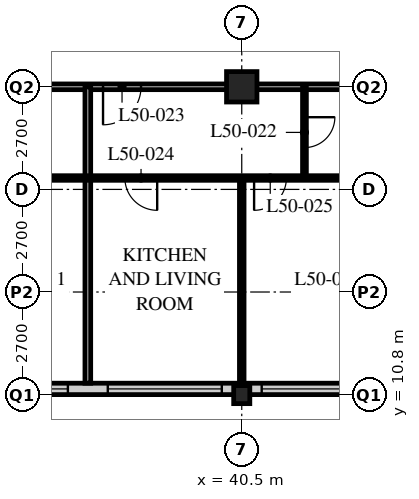
"""IFC4 building model, lengths in metres.
Left out: names, types, materials, properties, quantities, classifications, styles, units other than length and angle.
Written with IfcOpenShell. Run it as: python <this file> out.ifc"""

import sys

from ifc_helpers import new_model, si_unit, direction, frame, frame_2d, origin, origin_2d, place, context, subcontext, project, spatial, rectangle, hollow_rectangle, i_section, extrude, element, fill, save


model = new_model("IFC4")
c1 = context("Model", 3, precision=1e-05, world=origin(), true_north=direction((0.0, 1.0)))
c2 = subcontext(c1, "Body", "Model", "MODEL_VIEW")
j1 = project(units=[si_unit("LENGTHUNIT", "METRE"), si_unit("PLANEANGLEUNIT", "RADIAN")], contexts=[c1])
p1 = place(None, origin())
s1 = spatial("IfcSite", under=j1, at=p1, CompositionType="ELEMENT")
p2 = place(p1, origin())
s2 = spatial("IfcBuilding", under=s1, at=p2, CompositionType="ELEMENT")
p3 = place(p2, frame((0.0, 0.0, 195.6)))
s3 = spatial("IfcBuildingStorey", under=s2, at=p3, CompositionType="ELEMENT", Elevation=195.6)
p4 = place(p3, frame((40.5, 10.8, 0.0), z_axis=(0.0, 0.0, 1.0), x_axis=(1.0, 0.0, 0.0)))
e1 = element("IfcColumn", 1, at=p4, inside=s3, PredefinedType="COLUMN", context=c2, shape_type="SweptSolid", body=[
    extrude(i_section(OverallWidth=0.424, OverallDepth=0.475, WebThickness=0.048, FlangeThickness=0.077, FilletRadius=0.015, at=origin_2d()), origin(), (0.0, 0.0, 1.0), 3.6),
])
p5 = place(p3, frame((40.5, 18.9, 0.0), z_axis=(0.0, 0.0, 1.0), x_axis=(1.0, 0.0, 0.0)))
e2 = element("IfcColumn", 2, at=p5, inside=s3, PredefinedType="COLUMN", context=c2, shape_type="SweptSolid", body=[
    extrude(hollow_rectangle(XDim=0.8, YDim=0.8, WallThickness=0.08, at=origin_2d()), origin(), (0.0, 0.0, 1.0), 3.6),
])
p6 = place(p3, frame((8.4, 10.95, 0.0), z_axis=(0.0, 0.0, 1.0), x_axis=(1.0, 0.0, 0.0)))
e3 = element("IfcWall", 3, at=p6, inside=s3, PredefinedType="SOLIDWALL", context=c2, shape_type="SweptSolid", body=[
    extrude(rectangle(XDim=40.2, YDim=0.3, at=frame_2d((20.1, 0.0))), origin(), (0.0, 0.0, 1.0), 3.39),
])
p7 = place(p6, frame((0.225, 0.0, 0.6)))
e4 = element("IfcOpeningElement", 4, at=p7, cuts=e3, PredefinedType="OPENING", context=c2, shape_type="SweptSolid", body=[
    extrude(rectangle(XDim=3.0, YDim=2.4, at=frame_2d((1.5, 1.2))), frame((0.0, 0.16, 0.0), z_axis=(0.0, -1.0, 0.0), x_axis=(1.0, 0.0, 0.0)), (0.0, 0.0, 1.0), 0.32),
])
p8 = place(p6, frame((4.275, 0.0, 0.6)))
e5 = element("IfcOpeningElement", 5, at=p8, cuts=e3, PredefinedType="OPENING", context=c2, shape_type="SweptSolid", body=[
    extrude(rectangle(XDim=3.0, YDim=2.4, at=frame_2d((1.5, 1.2))), frame((0.0, 0.16, 0.0), z_axis=(0.0, -1.0, 0.0), x_axis=(1.0, 0.0, 0.0)), (0.0, 0.0, 1.0), 0.32),
])
p9 = place(p6, frame((8.325, 0.0, 0.6)))
e6 = element("IfcOpeningElement", 6, at=p9, cuts=e3, PredefinedType="OPENING", context=c2, shape_type="SweptSolid", body=[
    extrude(rectangle(XDim=3.0, YDim=2.4, at=frame_2d((1.5, 1.2))), frame((0.0, 0.16, 0.0), z_axis=(0.0, -1.0, 0.0), x_axis=(1.0, 0.0, 0.0)), (0.0, 0.0, 1.0), 0.32),
])
p10 = place(p6, frame((12.375, 0.0, 0.6)))
e7 = element("IfcOpeningElement", 7, at=p10, cuts=e3, PredefinedType="OPENING", context=c2, shape_type="SweptSolid", body=[
    extrude(rectangle(XDim=3.0, YDim=2.4, at=frame_2d((1.5, 1.2))), frame((0.0, 0.16, 0.0), z_axis=(0.0, -1.0, 0.0), x_axis=(1.0, 0.0, 0.0)), (0.0, 0.0, 1.0), 0.32),
])
p11 = place(p6, frame((16.425, 0.0, 0.6)))
e8 = element("IfcOpeningElement", 8, at=p11, cuts=e3, PredefinedType="OPENING", context=c2, shape_type="SweptSolid", body=[
    extrude(rectangle(XDim=3.0, YDim=2.4, at=frame_2d((1.5, 1.2))), frame((0.0, 0.16, 0.0), z_axis=(0.0, -1.0, 0.0), x_axis=(1.0, 0.0, 0.0)), (0.0, 0.0, 1.0), 0.32),
])
p12 = place(p6, frame((20.475, 0.0, 0.6)))
e9 = element("IfcOpeningElement", 9, at=p12, cuts=e3, PredefinedType="OPENING", context=c2, shape_type="SweptSolid", body=[
    extrude(rectangle(XDim=3.0, YDim=2.4, at=frame_2d((1.5, 1.2))), frame((0.0, 0.16, 0.0), z_axis=(0.0, -1.0, 0.0), x_axis=(1.0, 0.0, 0.0)), (0.0, 0.0, 1.0), 0.32),
])
p13 = place(p6, frame((24.525, 0.0, 0.6)))
e10 = element("IfcOpeningElement", 10, at=p13, cuts=e3, PredefinedType="OPENING", context=c2, shape_type="SweptSolid", body=[
    extrude(rectangle(XDim=3.0, YDim=2.4, at=frame_2d((1.5, 1.2))), frame((0.0, 0.16, 0.0), z_axis=(0.0, -1.0, 0.0), x_axis=(1.0, 0.0, 0.0)), (0.0, 0.0, 1.0), 0.32),
])
p14 = place(p6, frame((28.575, 0.0, 0.6)))
e11 = element("IfcOpeningElement", 11, at=p14, cuts=e3, PredefinedType="OPENING", context=c2, shape_type="SweptSolid", body=[
    extrude(rectangle(XDim=3.0, YDim=2.4, at=frame_2d((1.5, 1.2))), frame((0.0, 0.16, 0.0), z_axis=(0.0, -1.0, 0.0), x_axis=(1.0, 0.0, 0.0)), (0.0, 0.0, 1.0), 0.32),
])
p15 = place(p6, frame((32.625, 0.0, 0.6)))
e12 = element("IfcOpeningElement", 12, at=p15, cuts=e3, PredefinedType="OPENING", context=c2, shape_type="SweptSolid", body=[
    extrude(rectangle(XDim=3.0, YDim=2.4, at=frame_2d((1.5, 1.2))), frame((0.0, 0.16, 0.0), z_axis=(0.0, -1.0, 0.0), x_axis=(1.0, 0.0, 0.0)), (0.0, 0.0, 1.0), 0.32),
])
p16 = place(p6, frame((36.675, 0.0, 0.6)))
e13 = element("IfcOpeningElement", 13, at=p16, cuts=e3, PredefinedType="OPENING", context=c2, shape_type="SweptSolid", body=[
    extrude(rectangle(XDim=3.0, YDim=2.4, at=frame_2d((1.5, 1.2))), frame((0.0, 0.16, 0.0), z_axis=(0.0, -1.0, 0.0), x_axis=(1.0, 0.0, 0.0)), (0.0, 0.0, 1.0), 0.32),
])
p17 = place(p3, frame((8.1, 18.9, 0.0), z_axis=(0.0, 0.0, 1.0), x_axis=(1.0, 0.0, 0.0)))
e14 = element("IfcWall", 14, at=p17, inside=s3, PredefinedType="PARTITIONING", context=c2, shape_type="SweptSolid", body=[
    extrude(rectangle(XDim=40.5, YDim=0.15, at=frame_2d((20.25, 0.0))), origin(), (0.0, 0.0, 1.0), 2.778),
])
p18 = place(p17, frame((4.45, 0.0, 0.0)))
e15 = element("IfcOpeningElement", 15, at=p18, cuts=e14, PredefinedType="OPENING", context=c2, shape_type="SweptSolid", body=[
    extrude(rectangle(XDim=1.0, YDim=2.1, at=frame_2d((0.5, 1.05))), frame((0.0, 0.085, 0.0), z_axis=(0.0, -1.0, 0.0), x_axis=(1.0, 0.0, 0.0)), (0.0, 0.0, 1.0), 0.17),
])
p19 = place(p17, frame((17.1, 0.0, 0.0)))
e16 = element("IfcOpeningElement", 16, at=p19, cuts=e14, PredefinedType="OPENING", context=c2, shape_type="SweptSolid", body=[
    extrude(rectangle(XDim=1.0, YDim=2.1, at=frame_2d((0.5, 1.05))), frame((0.0, 0.085, 0.0), z_axis=(0.0, -1.0, 0.0), x_axis=(1.0, 0.0, 0.0)), (0.0, 0.0, 1.0), 0.17),
])
p20 = place(p17, frame((28.75, 0.0, 0.0)))
e17 = element("IfcOpeningElement", 17, at=p20, cuts=e14, PredefinedType="OPENING", context=c2, shape_type="SweptSolid", body=[
    extrude(rectangle(XDim=1.0, YDim=2.1, at=frame_2d((0.5, 1.05))), frame((0.0, 0.085, 0.0), z_axis=(0.0, -1.0, 0.0), x_axis=(1.0, 0.0, 0.0)), (0.0, 0.0, 1.0), 0.17),
])
p21 = place(p17, frame((2.625, 0.0, 0.0)))
e18 = element("IfcOpeningElement", 18, at=p21, cuts=e14, PredefinedType="OPENING", context=c2, shape_type="SweptSolid", body=[
    extrude(rectangle(XDim=1.0, YDim=2.1, at=frame_2d((0.5, 1.05))), frame((0.0, 0.085, 0.0), z_axis=(0.0, -1.0, 0.0), x_axis=(1.0, 0.0, 0.0)), (0.0, 0.0, 1.0), 0.17),
])
p22 = place(p17, frame((36.875, 0.0, 0.0)))
e19 = element("IfcOpeningElement", 19, at=p22, cuts=e14, PredefinedType="OPENING", context=c2, shape_type="SweptSolid", body=[
    extrude(rectangle(XDim=1.0, YDim=2.1, at=frame_2d((0.5, 1.05))), frame((0.0, 0.085, 0.0), z_axis=(0.0, -1.0, 0.0), x_axis=(1.0, 0.0, 0.0)), (0.0, 0.0, 1.0), 0.17),
])
p23 = place(p3, frame((36.45, 18.9, 0.0), z_axis=(0.0, 0.0, 1.0), x_axis=(0.0, -1.0, 0.0)))
e20 = element("IfcWall", 20, at=p23, inside=s3, PredefinedType="PARTITIONING", context=c2, shape_type="SweptSolid", body=[
    extrude(rectangle(XDim=7.8, YDim=0.15, at=frame_2d((3.9, 0.0))), origin(), (0.0, 0.0, 1.0), 3.39),
])
p24 = place(p3, frame((42.15, 18.9, 0.0), z_axis=(0.0, 0.0, 1.0), x_axis=(0.0, -1.0, 0.0)))
e21 = element("IfcWall", 21, at=p24, inside=s3, PredefinedType="PARTITIONING", context=c2, shape_type="SweptSolid", body=[
    extrude(rectangle(XDim=2.4, YDim=0.1, at=frame_2d((1.2, 0.0))), origin(), (0.0, 0.0, 1.0), 3.39),
])
p25 = place(p24, frame((0.8, 0.0, 0.0)))
e22 = element("IfcOpeningElement", 22, at=p25, cuts=e21, PredefinedType="OPENING", context=c2, shape_type="SweptSolid", body=[
    extrude(rectangle(XDim=0.8, YDim=2.1, at=frame_2d((0.4, 1.05))), frame((0.0, 0.06, 0.0), z_axis=(0.0, -1.0, 0.0), x_axis=(1.0, 0.0, 0.0)), (0.0, 0.0, 1.0), 0.12),
])
p26 = place(p3, frame((40.5, 16.5, 0.0), z_axis=(0.0, 0.0, 1.0), x_axis=(0.0, -1.0, 0.0)))
e23 = element("IfcWall", 23, at=p26, inside=s3, PredefinedType="PARTITIONING", context=c2, shape_type="SweptSolid", body=[
    extrude(rectangle(XDim=5.4, YDim=0.12, at=frame_2d((2.7, 0.0))), origin(), (0.0, 0.0, 1.0), 2.778),
])
p27 = place(p3, frame((8.1, 16.5, 0.0), z_axis=(0.0, 0.0, 1.0), x_axis=(1.0, 0.0, 0.0)))
e24 = element("IfcWall", 24, at=p27, inside=s3, PredefinedType="PARTITIONING", context=c2, shape_type="SweptSolid", body=[
    extrude(rectangle(XDim=40.5, YDim=0.12, at=frame_2d((20.25, 0.0))), origin(), (0.0, 0.0, 1.0), 3.39),
])
p28 = place(p27, frame((5.025, 0.0, 0.0)))
e25 = element("IfcOpeningElement", 25, at=p28, cuts=e24, PredefinedType="OPENING", context=c2, shape_type="SweptSolid", body=[
    extrude(rectangle(XDim=0.85, YDim=2.1, at=frame_2d((0.425, 1.05))), frame((0.0, 0.07, 0.0), z_axis=(0.0, -1.0, 0.0), x_axis=(1.0, 0.0, 0.0)), (0.0, 0.0, 1.0), 0.14),
])
p29 = place(p27, frame((12.475, 0.0, 0.0)))
e26 = element("IfcOpeningElement", 26, at=p29, cuts=e24, PredefinedType="OPENING", context=c2, shape_type="SweptSolid", body=[
    extrude(rectangle(XDim=0.85, YDim=2.1, at=frame_2d((0.425, 1.05))), frame((0.0, 0.07, 0.0), z_axis=(0.0, -1.0, 0.0), x_axis=(1.0, 0.0, 0.0)), (0.0, 0.0, 1.0), 0.14),
])
p30 = place(p27, frame((17.175, 0.0, 0.0)))
e27 = element("IfcOpeningElement", 27, at=p30, cuts=e24, PredefinedType="OPENING", context=c2, shape_type="SweptSolid", body=[
    extrude(rectangle(XDim=0.85, YDim=2.1, at=frame_2d((0.425, 1.05))), frame((0.0, 0.07, 0.0), z_axis=(0.0, -1.0, 0.0), x_axis=(1.0, 0.0, 0.0)), (0.0, 0.0, 1.0), 0.14),
])
p31 = place(p27, frame((24.625, 0.0, 0.0)))
e28 = element("IfcOpeningElement", 28, at=p31, cuts=e24, PredefinedType="OPENING", context=c2, shape_type="SweptSolid", body=[
    extrude(rectangle(XDim=0.85, YDim=2.1, at=frame_2d((0.425, 1.05))), frame((0.0, 0.07, 0.0), z_axis=(0.0, -1.0, 0.0), x_axis=(1.0, 0.0, 0.0)), (0.0, 0.0, 1.0), 0.14),
])
p32 = place(p27, frame((29.325, 0.0, 0.0)))
e29 = element("IfcOpeningElement", 29, at=p32, cuts=e24, PredefinedType="OPENING", context=c2, shape_type="SweptSolid", body=[
    extrude(rectangle(XDim=0.85, YDim=2.1, at=frame_2d((0.425, 1.05))), frame((0.0, 0.07, 0.0), z_axis=(0.0, -1.0, 0.0), x_axis=(1.0, 0.0, 0.0)), (0.0, 0.0, 1.0), 0.14),
])
p33 = place(p27, frame((32.725, 0.0, 0.0)))
e30 = element("IfcOpeningElement", 30, at=p33, cuts=e24, PredefinedType="OPENING", context=c2, shape_type="SweptSolid", body=[
    extrude(rectangle(XDim=0.85, YDim=2.1, at=frame_2d((0.425, 1.05))), frame((0.0, 0.07, 0.0), z_axis=(0.0, -1.0, 0.0), x_axis=(1.0, 0.0, 0.0)), (0.0, 0.0, 1.0), 0.14),
])
p34 = place(p27, frame((2.725, 0.0, 0.0)))
e31 = element("IfcOpeningElement", 31, at=p34, cuts=e24, PredefinedType="OPENING", context=c2, shape_type="SweptSolid", body=[
    extrude(rectangle(XDim=0.85, YDim=2.1, at=frame_2d((0.425, 1.05))), frame((0.0, 0.07, 0.0), z_axis=(0.0, -1.0, 0.0), x_axis=(1.0, 0.0, 0.0)), (0.0, 0.0, 1.0), 0.14),
])
p35 = place(p27, frame((36.925, 0.0, 0.0)))
e32 = element("IfcOpeningElement", 32, at=p35, cuts=e24, PredefinedType="OPENING", context=c2, shape_type="SweptSolid", body=[
    extrude(rectangle(XDim=0.85, YDim=2.1, at=frame_2d((0.425, 1.05))), frame((0.0, 0.07, 0.0), z_axis=(0.0, -1.0, 0.0), x_axis=(1.0, 0.0, 0.0)), (0.0, 0.0, 1.0), 0.14),
])
p36 = place(p13, origin())
e33 = element("IfcWindow", 33, at=p36, inside=s3, PartitioningType="SINGLE_PANEL", PredefinedType="WINDOW", context=c2, shape_type="SweptSolid", body=[
    extrude(rectangle(XDim=3.0, YDim=2.4, at=frame_2d((1.5, 1.2))), frame((0.0, 0.03, 0.0), z_axis=(0.0, -1.0, 0.0), x_axis=(1.0, 0.0, 0.0)), (0.0, 0.0, 1.0), 0.06),
])
fill(e10, e33)
p37 = place(p14, origin())
e34 = element("IfcWindow", 34, at=p37, inside=s3, PartitioningType="SINGLE_PANEL", PredefinedType="WINDOW", context=c2, shape_type="SweptSolid", body=[
    extrude(rectangle(XDim=3.0, YDim=2.4, at=frame_2d((1.5, 1.2))), frame((0.0, 0.03, 0.0), z_axis=(0.0, -1.0, 0.0), x_axis=(1.0, 0.0, 0.0)), (0.0, 0.0, 1.0), 0.06),
])
fill(e11, e34)
p38 = place(p15, origin())
e35 = element("IfcWindow", 35, at=p38, inside=s3, PartitioningType="SINGLE_PANEL", PredefinedType="WINDOW", context=c2, shape_type="SweptSolid", body=[
    extrude(rectangle(XDim=3.0, YDim=2.4, at=frame_2d((1.5, 1.2))), frame((0.0, 0.03, 0.0), z_axis=(0.0, -1.0, 0.0), x_axis=(1.0, 0.0, 0.0)), (0.0, 0.0, 1.0), 0.06),
])
fill(e12, e35)
p39 = place(p25, origin())
e36 = element("IfcDoor", 36, at=p39, inside=s3, OperationType="SINGLE_SWING_LEFT", PredefinedType="DOOR", context=c2, shape_type="SweptSolid", body=[
    extrude(rectangle(XDim=0.8, YDim=2.1, at=frame_2d((0.4, 1.05))), frame((0.0, 0.025, 0.0), z_axis=(0.0, -1.0, 0.0), x_axis=(1.0, 0.0, 0.0)), (0.0, 0.0, 1.0), 0.05),
])
fill(e22, e36)
p40 = place(p20, origin())
e37 = element("IfcDoor", 37, at=p40, inside=s3, OperationType="SINGLE_SWING_RIGHT", PredefinedType="DOOR", context=c2, shape_type="SweptSolid", body=[
    extrude(rectangle(XDim=1.0, YDim=2.1, at=frame_2d((0.5, 1.05))), frame((0.0, 0.025, 0.0), z_axis=(0.0, -1.0, 0.0), x_axis=(1.0, 0.0, 0.0)), (0.0, 0.0, 1.0), 0.05),
])
fill(e17, e37)
p41 = place(p32, origin())
e38 = element("IfcDoor", 38, at=p41, inside=s3, OperationType="SINGLE_SWING_LEFT", PredefinedType="DOOR", context=c2, shape_type="SweptSolid", body=[
    extrude(rectangle(XDim=0.85, YDim=2.1, at=frame_2d((0.425, 1.05))), frame((0.0, 0.025, 0.0), z_axis=(0.0, -1.0, 0.0), x_axis=(1.0, 0.0, 0.0)), (0.0, 0.0, 1.0), 0.05),
])
fill(e29, e38)
p42 = place(p33, origin())
e39 = element("IfcDoor", 39, at=p42, inside=s3, OperationType="SINGLE_SWING_RIGHT", PredefinedType="DOOR", context=c2, shape_type="SweptSolid", body=[
    extrude(rectangle(XDim=0.85, YDim=2.1, at=frame_2d((0.425, 1.05))), frame((0.0, 0.025, 0.0), z_axis=(0.0, -1.0, 0.0), x_axis=(1.0, 0.0, 0.0)), (0.0, 0.0, 1.0), 0.05),
])
fill(e30, e39)
save(model, sys.argv[1])
